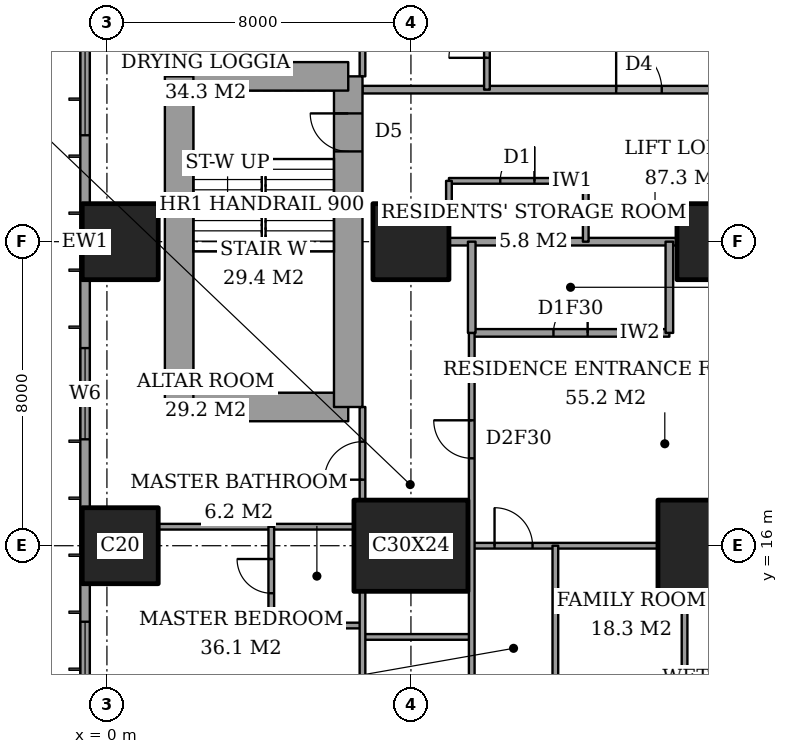
"""IFC4 building model, lengths in metres.
Left out: names, types, materials, properties, quantities, classifications, styles, units other than length and angle.
Written with IfcOpenShell. Run it as: python <this file> out.ifc"""

import sys

from ifc_helpers import new_model, si_unit, direction, frame, frame_2d, origin, origin_2d, place, context, subcontext, project, spatial, rectangle, extrude, element, fill, save


model = new_model("IFC4")
c1 = context("Model", 3, precision=1e-05, world=origin(), true_north=direction((0.0, 1.0)))
c2 = subcontext(c1, "Body", "Model", "MODEL_VIEW")
j1 = project(units=[si_unit("LENGTHUNIT", "METRE"), si_unit("PLANEANGLEUNIT", "RADIAN")], contexts=[c1])
p1 = place(None, origin())
s1 = spatial("IfcSite", under=j1, at=p1, CompositionType="ELEMENT")
p2 = place(p1, origin())
s2 = spatial("IfcBuilding", under=s1, at=p2, CompositionType="ELEMENT")
p3 = place(p2, frame((0.0, 0.0, 80.0)))
s3 = spatial("IfcBuildingStorey", under=s2, at=p3, CompositionType="ELEMENT", Elevation=80.0)
for number, where, z_axis, x_axis in (
    (1, (0.35, 16.0, 0.0), (0.0, 0.0, 1.0), (1.0, 0.0, 0.0)),
    (2, (0.35, 24.0, 0.0), (0.0, 0.0, 1.0), (1.0, 0.0, 0.0)),
):
    element("IfcColumn", number, at=place(p3, frame(where, z_axis=z_axis, x_axis=x_axis)), inside=s3, PredefinedType="COLUMN", context=c2, shape_type="SweptSolid", body=[
        extrude(rectangle(XDim=2.0, YDim=2.0, at=origin_2d()), origin(), (0.0, 0.0, 1.0), 3.6),
    ])
p4 = place(p3, frame((8.0, 16.0, 0.0), z_axis=(0.0, 0.0, 1.0), x_axis=(1.0, 0.0, 0.0)))
e3 = element("IfcColumn", 3, at=p4, inside=s3, PredefinedType="COLUMN", context=c2, shape_type="SweptSolid", body=[
    extrude(rectangle(XDim=3.0, YDim=2.4, at=origin_2d()), origin(), (0.0, 0.0, 1.0), 3.6),
])
p5 = place(p3, frame((8.0, 24.0, 0.0), z_axis=(0.0, 0.0, 1.0), x_axis=(1.0, 0.0, 0.0)))
e4 = element("IfcColumn", 4, at=p5, inside=s3, PredefinedType="COLUMN", context=c2, shape_type="SweptSolid", body=[
    extrude(rectangle(XDim=2.0, YDim=2.0, at=origin_2d()), origin(), (0.0, 0.0, 1.0), 3.6),
])
p6 = place(p3, frame((16.0, 16.0, 0.0), z_axis=(0.0, 0.0, 1.0), x_axis=(1.0, 0.0, 0.0)))
e5 = element("IfcColumn", 5, at=p6, inside=s3, PredefinedType="COLUMN", context=c2, shape_type="SweptSolid", body=[
    extrude(rectangle(XDim=3.0, YDim=2.4, at=origin_2d()), origin(), (0.0, 0.0, 1.0), 3.6),
])
p7 = place(p3, frame((16.0, 24.0, 0.0), z_axis=(0.0, 0.0, 1.0), x_axis=(1.0, 0.0, 0.0)))
e6 = element("IfcColumn", 6, at=p7, inside=s3, PredefinedType="COLUMN", context=c2, shape_type="SweptSolid", body=[
    extrude(rectangle(XDim=2.0, YDim=2.0, at=origin_2d()), origin(), (0.0, 0.0, 1.0), 3.6),
])
p8 = place(p3, frame((1.9, 19.65, 0.0), z_axis=(0.0, 0.0, 1.0), x_axis=(1.0, 0.0, 0.0)))
e7 = element("IfcWall", 7, at=p8, inside=s3, PredefinedType="SHEAR", context=c2, shape_type="SweptSolid", body=[
    extrude(rectangle(XDim=4.45, YDim=0.75, at=frame_2d((2.225, 0.0))), origin(), (0.0, 0.0, 1.0), 3.6),
])
p9 = place(p3, frame((6.35, 19.65, 0.0), z_axis=(0.0, 0.0, 1.0), x_axis=(0.0, 1.0, 0.0)))
e8 = element("IfcWall", 8, at=p9, inside=s3, PredefinedType="SHEAR", context=c2, shape_type="SweptSolid", body=[
    extrude(rectangle(XDim=8.7, YDim=0.75, at=frame_2d((4.35, 0.0))), origin(), (0.0, 0.0, 1.0), 3.6),
])
p10 = place(p9, frame((6.725, 0.0, 0.0)))
e9 = element("IfcOpeningElement", 9, at=p10, cuts=e8, PredefinedType="OPENING", context=c2, shape_type="SweptSolid", body=[
    extrude(rectangle(XDim=1.0, YDim=2.1, at=frame_2d((0.5, 1.05))), frame((0.0, 0.385, 0.0), z_axis=(0.0, -1.0, 0.0), x_axis=(1.0, 0.0, 0.0)), (0.0, 0.0, 1.0), 0.77),
])
p11 = place(p3, frame((6.35, 28.35, 0.0), z_axis=(0.0, 0.0, 1.0), x_axis=(-1.0, 0.0, 0.0)))
e10 = element("IfcWall", 10, at=p11, inside=s3, PredefinedType="SHEAR", context=c2, shape_type="SweptSolid", body=[
    extrude(rectangle(XDim=4.45, YDim=0.75, at=frame_2d((2.225, 0.0))), origin(), (0.0, 0.0, 1.0), 3.6),
])
p12 = place(p3, frame((1.9, 28.35, 0.0), z_axis=(0.0, 0.0, 1.0), x_axis=(0.0, -1.0, 0.0)))
e11 = element("IfcWall", 11, at=p12, inside=s3, PredefinedType="SHEAR", context=c2, shape_type="SweptSolid", body=[
    extrude(rectangle(XDim=8.7, YDim=0.75, at=frame_2d((4.35, 0.0))), origin(), (0.0, 0.0, 1.0), 3.6),
])
p13 = place(p3, frame((-0.575, 44.825, 0.0), z_axis=(0.0, 0.0, 1.0), x_axis=(0.0, -1.0, 0.0)))
e12 = element("IfcWall", 12, at=p13, inside=s3, PredefinedType="SOLIDWALL", context=c2, shape_type="SweptSolid", body=[
    extrude(rectangle(XDim=41.65, YDim=0.25, at=frame_2d((20.825, 0.0))), origin(), (0.0, 0.0, 1.0), 3.6),
])
p14 = place(p13, frame((0.775, 0.0, 0.6)))
e13 = element("IfcOpeningElement", 13, at=p14, cuts=e12, PredefinedType="OPENING", context=c2, shape_type="SweptSolid", body=[
    extrude(rectangle(XDim=2.4, YDim=2.0, at=frame_2d((1.2, 1.0))), frame((0.0, 0.135, 0.0), z_axis=(0.0, -1.0, 0.0), x_axis=(1.0, 0.0, 0.0)), (0.0, 0.0, 1.0), 0.27),
])
p15 = place(p13, frame((6.1, 0.0, 0.6)))
e14 = element("IfcOpeningElement", 14, at=p15, cuts=e12, PredefinedType="OPENING", context=c2, shape_type="SweptSolid", body=[
    extrude(rectangle(XDim=1.2, YDim=2.0, at=frame_2d((0.6, 1.0))), frame((0.0, 0.135, 0.0), z_axis=(0.0, -1.0, 0.0), x_axis=(1.0, 0.0, 0.0)), (0.0, 0.0, 1.0), 0.27),
])
p16 = place(p13, frame((8.425, 0.0, 0.6)))
e15 = element("IfcOpeningElement", 15, at=p16, cuts=e12, PredefinedType="OPENING", context=c2, shape_type="SweptSolid", body=[
    extrude(rectangle(XDim=2.4, YDim=2.0, at=frame_2d((1.2, 1.0))), frame((0.0, 0.135, 0.0), z_axis=(0.0, -1.0, 0.0), x_axis=(1.0, 0.0, 0.0)), (0.0, 0.0, 1.0), 0.27),
])
p17 = place(p13, frame((15.625, 0.0, 0.6)))
e16 = element("IfcOpeningElement", 16, at=p17, cuts=e12, PredefinedType="OPENING", context=c2, shape_type="SweptSolid", body=[
    extrude(rectangle(XDim=2.4, YDim=2.0, at=frame_2d((1.2, 1.0))), frame((0.0, 0.135, 0.0), z_axis=(0.0, -1.0, 0.0), x_axis=(1.0, 0.0, 0.0)), (0.0, 0.0, 1.0), 0.27),
])
p18 = place(p13, frame((23.625, 0.0, 0.6)))
e17 = element("IfcOpeningElement", 17, at=p18, cuts=e12, PredefinedType="OPENING", context=c2, shape_type="SweptSolid", body=[
    extrude(rectangle(XDim=2.4, YDim=2.0, at=frame_2d((1.2, 1.0))), frame((0.0, 0.135, 0.0), z_axis=(0.0, -1.0, 0.0), x_axis=(1.0, 0.0, 0.0)), (0.0, 0.0, 1.0), 0.27),
])
p19 = place(p13, frame((30.825, 0.0, 0.6)))
e18 = element("IfcOpeningElement", 18, at=p19, cuts=e12, PredefinedType="OPENING", context=c2, shape_type="SweptSolid", body=[
    extrude(rectangle(XDim=2.4, YDim=2.0, at=frame_2d((1.2, 1.0))), frame((0.0, 0.135, 0.0), z_axis=(0.0, -1.0, 0.0), x_axis=(1.0, 0.0, 0.0)), (0.0, 0.0, 1.0), 0.27),
])
p20 = place(p13, frame((34.5, 0.0, 0.6)))
e19 = element("IfcOpeningElement", 19, at=p20, cuts=e12, PredefinedType="OPENING", context=c2, shape_type="SweptSolid", body=[
    extrude(rectangle(XDim=1.2, YDim=2.0, at=frame_2d((0.6, 1.0))), frame((0.0, 0.135, 0.0), z_axis=(0.0, -1.0, 0.0), x_axis=(1.0, 0.0, 0.0)), (0.0, 0.0, 1.0), 0.27),
])
p21 = place(p13, frame((38.475, 0.0, 0.6)))
e20 = element("IfcOpeningElement", 20, at=p21, cuts=e12, PredefinedType="OPENING", context=c2, shape_type="SweptSolid", body=[
    extrude(rectangle(XDim=2.4, YDim=2.0, at=frame_2d((1.2, 1.0))), frame((0.0, 0.135, 0.0), z_axis=(0.0, -1.0, 0.0), x_axis=(1.0, 0.0, 0.0)), (0.0, 0.0, 1.0), 0.27),
])
p22 = place(p3, frame((6.725, 13.6, 0.0), z_axis=(0.0, 0.0, 1.0), x_axis=(1.0, 0.0, 0.0)))
e21 = element("IfcWall", 21, at=p22, inside=s3, PredefinedType="PARTITIONING", context=c2, shape_type="SweptSolid", body=[
    extrude(rectangle(XDim=2.875, YDim=0.15, at=frame_2d((1.438, 0.0))), origin(), (0.0, 0.0, 1.0), 3.35),
])
p23 = place(p3, frame((4.325, 13.9, 0.0), z_axis=(0.0, 0.0, 1.0), x_axis=(1.0, 0.0, 0.0)))
e22 = element("IfcWall", 22, at=p23, inside=s3, PredefinedType="PARTITIONING", context=c2, shape_type="SweptSolid", body=[
    extrude(rectangle(XDim=2.4, YDim=0.15, at=frame_2d((1.2, 0.0))), origin(), (0.0, 0.0, 1.0), 3.35),
])
p24 = place(p3, frame((9.6, 16.0, 0.0), z_axis=(0.0, 0.0, 1.0), x_axis=(1.0, 0.0, 0.0)))
e23 = element("IfcWall", 23, at=p24, inside=s3, PredefinedType="PARTITIONING", context=c2, shape_type="SweptSolid", body=[
    extrude(rectangle(XDim=4.9, YDim=0.15, at=frame_2d((2.45, 0.0))), origin(), (0.0, 0.0, 1.0), 2.634),
])
p25 = place(p24, frame((0.6, 0.0, 0.0)))
e24 = element("IfcOpeningElement", 24, at=p25, cuts=e23, PredefinedType="OPENING", context=c2, shape_type="SweptSolid", body=[
    extrude(rectangle(XDim=1.0, YDim=2.1, at=frame_2d((0.5, 1.05))), frame((0.0, 0.085, 0.0), z_axis=(0.0, -1.0, 0.0), x_axis=(1.0, 0.0, 0.0)), (0.0, 0.0, 1.0), 0.17),
])
p26 = place(p3, frame((1.35, 16.5, 0.0), z_axis=(0.0, 0.0, 1.0), x_axis=(1.0, 0.0, 0.0)))
e25 = element("IfcWall", 25, at=p26, inside=s3, PredefinedType="PARTITIONING", context=c2, shape_type="SweptSolid", body=[
    extrude(rectangle(XDim=5.15, YDim=0.15, at=frame_2d((2.575, 0.0))), origin(), (0.0, 0.0, 1.0), 3.35),
])
p27 = place(p3, frame((9.6, 21.6, 0.0), z_axis=(0.0, 0.0, 1.0), x_axis=(1.0, 0.0, 0.0)))
e26 = element("IfcWall", 26, at=p27, inside=s3, PredefinedType="PARTITIONING", context=c2, shape_type="SweptSolid", body=[
    extrude(rectangle(XDim=5.2, YDim=0.2, at=frame_2d((2.6, 0.0))), origin(), (0.0, 0.0, 1.0), 3.35),
])
p28 = place(p27, frame((2.15, 0.0, 0.0)))
e27 = element("IfcOpeningElement", 27, at=p28, cuts=e26, PredefinedType="OPENING", context=c2, shape_type="SweptSolid", body=[
    extrude(rectangle(XDim=0.9, YDim=2.1, at=frame_2d((0.45, 1.05))), frame((0.0, 0.11, 0.0), z_axis=(0.0, -1.0, 0.0), x_axis=(1.0, 0.0, 0.0)), (0.0, 0.0, 1.0), 0.22),
])
p29 = place(p3, frame((9.0, 24.0, 0.0), z_axis=(0.0, 0.0, 1.0), x_axis=(1.0, 0.0, 0.0)))
e28 = element("IfcWall", 28, at=p29, inside=s3, PredefinedType="PARTITIONING", context=c2, shape_type="SweptSolid", body=[
    extrude(rectangle(XDim=6.0, YDim=0.2, at=frame_2d((3.0, 0.0))), origin(), (0.0, 0.0, 1.0), 3.35),
])
p30 = place(p3, frame((9.0, 25.6, 0.0), z_axis=(0.0, 0.0, 1.0), x_axis=(1.0, 0.0, 0.0)))
e29 = element("IfcWall", 29, at=p30, inside=s3, PredefinedType="PARTITIONING", context=c2, shape_type="SweptSolid", body=[
    extrude(rectangle(XDim=3.6, YDim=0.15, at=frame_2d((1.8, 0.0))), origin(), (0.0, 0.0, 1.0), 3.35),
])
p31 = place(p30, frame((1.35, 0.0, 0.0)))
e30 = element("IfcOpeningElement", 30, at=p31, cuts=e29, PredefinedType="OPENING", context=c2, shape_type="SweptSolid", body=[
    extrude(rectangle(XDim=0.9, YDim=2.1, at=frame_2d((0.45, 1.05))), frame((0.0, 0.085, 0.0), z_axis=(0.0, -1.0, 0.0), x_axis=(1.0, 0.0, 0.0)), (0.0, 0.0, 1.0), 0.17),
])
p32 = place(p3, frame((6.725, 28.0, 0.0), z_axis=(0.0, 0.0, 1.0), x_axis=(1.0, 0.0, 0.0)))
e31 = element("IfcWall", 31, at=p32, inside=s3, PredefinedType="PARTITIONING", context=c2, shape_type="SweptSolid", body=[
    extrude(rectangle(XDim=17.275, YDim=0.2, at=frame_2d((8.637, 0.0))), origin(), (0.0, 0.0, 1.0), 3.35),
])
p33 = place(p32, frame((6.675, 0.0, 0.0)))
e32 = element("IfcOpeningElement", 32, at=p33, cuts=e31, PredefinedType="OPENING", context=c2, shape_type="SweptSolid", body=[
    extrude(rectangle(XDim=1.2, YDim=2.4, at=frame_2d((0.6, 1.2))), frame((0.0, 0.11, 0.0), z_axis=(0.0, -1.0, 0.0), x_axis=(1.0, 0.0, 0.0)), (0.0, 0.0, 1.0), 0.22),
])
p34 = place(p3, frame((4.325, 13.9, 0.0), z_axis=(0.0, 0.0, 1.0), x_axis=(0.0, 1.0, 0.0)))
e33 = element("IfcWall", 33, at=p34, inside=s3, PredefinedType="PARTITIONING", context=c2, shape_type="SweptSolid", body=[
    extrude(rectangle(XDim=2.6, YDim=0.15, at=frame_2d((1.3, 0.0))), origin(), (0.0, 0.0, 1.0), 3.35),
])
p35 = place(p34, frame((0.85, 0.0, 0.0)))
e34 = element("IfcOpeningElement", 34, at=p35, cuts=e33, PredefinedType="OPENING", context=c2, shape_type="SweptSolid", body=[
    extrude(rectangle(XDim=0.9, YDim=2.1, at=frame_2d((0.45, 1.05))), frame((0.0, 0.085, 0.0), z_axis=(0.0, -1.0, 0.0), x_axis=(1.0, 0.0, 0.0)), (0.0, 0.0, 1.0), 0.17),
])
p36 = place(p3, frame((6.725, 10.6, 0.0), z_axis=(0.0, 0.0, 1.0), x_axis=(0.0, 1.0, 0.0)))
e35 = element("IfcWall", 35, at=p36, inside=s3, PredefinedType="PARTITIONING", context=c2, shape_type="SweptSolid", body=[
    extrude(rectangle(XDim=4.2, YDim=0.15, at=frame_2d((2.1, 0.0))), origin(), (0.0, 0.0, 1.0), 3.35),
])
p37 = place(p36, frame((1.05, 0.0, 0.0)))
e36 = element("IfcOpeningElement", 36, at=p37, cuts=e35, PredefinedType="OPENING", context=c2, shape_type="SweptSolid", body=[
    extrude(rectangle(XDim=0.9, YDim=2.1, at=frame_2d((0.45, 1.05))), frame((0.0, 0.085, 0.0), z_axis=(0.0, -1.0, 0.0), x_axis=(1.0, 0.0, 0.0)), (0.0, 0.0, 1.0), 0.17),
])
p38 = place(p3, frame((6.725, 17.2, 0.0), z_axis=(0.0, 0.0, 1.0), x_axis=(0.0, 1.0, 0.0)))
e37 = element("IfcWall", 37, at=p38, inside=s3, PredefinedType="PARTITIONING", context=c2, shape_type="SweptSolid", body=[
    extrude(rectangle(XDim=2.45, YDim=0.15, at=frame_2d((1.225, 0.0))), origin(), (0.0, 0.0, 1.0), 3.35),
])
p39 = place(p38, frame((0.538, 0.0, 0.0)))
e38 = element("IfcOpeningElement", 38, at=p39, cuts=e37, PredefinedType="OPENING", context=c2, shape_type="SweptSolid", body=[
    extrude(rectangle(XDim=1.0, YDim=2.1, at=frame_2d((0.5, 1.05))), frame((0.0, 0.085, 0.0), z_axis=(0.0, -1.0, 0.0), x_axis=(1.0, 0.0, 0.0)), (0.0, 0.0, 1.0), 0.17),
])
p40 = place(p3, frame((6.725, 28.35, 0.0), z_axis=(0.0, 0.0, 1.0), x_axis=(0.0, 1.0, 0.0)))
e39 = element("IfcWall", 39, at=p40, inside=s3, PredefinedType="PARTITIONING", context=c2, shape_type="SweptSolid", body=[
    extrude(rectangle(XDim=2.45, YDim=0.15, at=frame_2d((1.225, 0.0))), origin(), (0.0, 0.0, 1.0), 3.35),
])
p41 = place(p40, frame((0.962, 0.0, 0.0)))
e40 = element("IfcOpeningElement", 40, at=p41, cuts=e39, PredefinedType="OPENING", context=c2, shape_type="SweptSolid", body=[
    extrude(rectangle(XDim=0.9, YDim=2.1, at=frame_2d((0.45, 1.05))), frame((0.0, 0.085, 0.0), z_axis=(0.0, -1.0, 0.0), x_axis=(1.0, 0.0, 0.0)), (0.0, 0.0, 1.0), 0.17),
])
p42 = place(p3, frame((9.0, 25.0, 0.0), z_axis=(0.0, 0.0, 1.0), x_axis=(0.0, 1.0, 0.0)))
e41 = element("IfcWall", 41, at=p42, inside=s3, PredefinedType="PARTITIONING", context=c2, shape_type="SweptSolid", body=[
    extrude(rectangle(XDim=0.6, YDim=0.15, at=frame_2d((0.3, 0.0))), origin(), (0.0, 0.0, 1.0), 3.35),
])
p43 = place(p3, frame((9.6, 21.6, 0.0), z_axis=(0.0, 0.0, 1.0), x_axis=(0.0, 1.0, 0.0)))
e42 = element("IfcWall", 42, at=p43, inside=s3, PredefinedType="PARTITIONING", context=c2, shape_type="SweptSolid", body=[
    extrude(rectangle(XDim=2.4, YDim=0.2, at=frame_2d((1.2, 0.0))), origin(), (0.0, 0.0, 1.0), 3.35),
])
p44 = place(p3, frame((9.6, 10.6, 0.0), z_axis=(0.0, 0.0, 1.0), x_axis=(0.0, 1.0, 0.0)))
e43 = element("IfcWall", 43, at=p44, inside=s3, PredefinedType="PARTITIONING", context=c2, shape_type="SweptSolid", body=[
    extrude(rectangle(XDim=11.0, YDim=0.15, at=frame_2d((5.5, 0.0))), origin(), (0.0, 0.0, 1.0), 3.35),
])
p45 = place(p44, frame((7.7, 0.0, 0.0)))
e44 = element("IfcOpeningElement", 44, at=p45, cuts=e43, PredefinedType="OPENING", context=c2, shape_type="SweptSolid", body=[
    extrude(rectangle(XDim=1.0, YDim=2.1, at=frame_2d((0.5, 1.05))), frame((0.0, 0.085, 0.0), z_axis=(0.0, -1.0, 0.0), x_axis=(1.0, 0.0, 0.0)), (0.0, 0.0, 1.0), 0.17),
])
p46 = place(p3, frame((10.0, 28.0, 0.0), z_axis=(0.0, 0.0, 1.0), x_axis=(0.0, 1.0, 0.0)))
e45 = element("IfcWall", 45, at=p46, inside=s3, PredefinedType="PARTITIONING", context=c2, shape_type="SweptSolid", body=[
    extrude(rectangle(XDim=3.0, YDim=0.15, at=frame_2d((1.5, 0.0))), origin(), (0.0, 0.0, 1.0), 3.35),
])
p47 = place(p46, frame((0.837, 0.0, 0.0)))
e46 = element("IfcOpeningElement", 46, at=p47, cuts=e45, PredefinedType="OPENING", context=c2, shape_type="SweptSolid", body=[
    extrude(rectangle(XDim=1.0, YDim=2.1, at=frame_2d((0.5, 1.05))), frame((0.0, 0.085, 0.0), z_axis=(0.0, -1.0, 0.0), x_axis=(1.0, 0.0, 0.0)), (0.0, 0.0, 1.0), 0.17),
])
p48 = place(p3, frame((11.8, 10.6, 0.0), z_axis=(0.0, 0.0, 1.0), x_axis=(0.0, 1.0, 0.0)))
e47 = element("IfcWall", 47, at=p48, inside=s3, PredefinedType="PARTITIONING", context=c2, shape_type="SweptSolid", body=[
    extrude(rectangle(XDim=5.4, YDim=0.15, at=frame_2d((2.7, 0.0))), origin(), (0.0, 0.0, 1.0), 3.35),
])
p49 = place(p3, frame((12.6, 24.0, 0.0), z_axis=(0.0, 0.0, 1.0), x_axis=(0.0, 1.0, 0.0)))
e48 = element("IfcWall", 48, at=p49, inside=s3, PredefinedType="PARTITIONING", context=c2, shape_type="SweptSolid", body=[
    extrude(rectangle(XDim=1.6, YDim=0.15, at=frame_2d((0.8, 0.0))), origin(), (0.0, 0.0, 1.0), 3.35),
])
p50 = place(p3, frame((14.8, 21.6, 0.0), z_axis=(0.0, 0.0, 1.0), x_axis=(0.0, 1.0, 0.0)))
e49 = element("IfcWall", 49, at=p50, inside=s3, PredefinedType="PARTITIONING", context=c2, shape_type="SweptSolid", body=[
    extrude(rectangle(XDim=2.4, YDim=0.2, at=frame_2d((1.2, 0.0))), origin(), (0.0, 0.0, 1.0), 3.35),
])
p51 = place(p3, frame((15.2, 10.6, 0.0), z_axis=(0.0, 0.0, 1.0), x_axis=(0.0, 1.0, 0.0)))
e50 = element("IfcWall", 50, at=p51, inside=s3, PredefinedType="PARTITIONING", context=c2, shape_type="SweptSolid", body=[
    extrude(rectangle(XDim=4.2, YDim=0.15, at=frame_2d((2.1, 0.0))), origin(), (0.0, 0.0, 1.0), 3.35),
])
p52 = place(p17, origin())
e51 = element("IfcWindow", 51, at=p52, inside=s3, PartitioningType="SINGLE_PANEL", PredefinedType="WINDOW", context=c2, shape_type="SweptSolid", body=[
    extrude(rectangle(XDim=2.4, YDim=2.0, at=frame_2d((1.2, 1.0))), frame((0.0, 0.03, 0.0), z_axis=(0.0, -1.0, 0.0), x_axis=(1.0, 0.0, 0.0)), (0.0, 0.0, 1.0), 0.06),
])
fill(e16, e51)
p53 = place(p18, origin())
e52 = element("IfcWindow", 52, at=p53, inside=s3, PartitioningType="SINGLE_PANEL", PredefinedType="WINDOW", context=c2, shape_type="SweptSolid", body=[
    extrude(rectangle(XDim=2.4, YDim=2.0, at=frame_2d((1.2, 1.0))), frame((0.0, 0.03, 0.0), z_axis=(0.0, -1.0, 0.0), x_axis=(1.0, 0.0, 0.0)), (0.0, 0.0, 1.0), 0.06),
])
fill(e17, e52)
p54 = place(p19, origin())
e53 = element("IfcWindow", 53, at=p54, inside=s3, PartitioningType="SINGLE_PANEL", PredefinedType="WINDOW", context=c2, shape_type="SweptSolid", body=[
    extrude(rectangle(XDim=2.4, YDim=2.0, at=frame_2d((1.2, 1.0))), frame((0.0, 0.03, 0.0), z_axis=(0.0, -1.0, 0.0), x_axis=(1.0, 0.0, 0.0)), (0.0, 0.0, 1.0), 0.06),
])
fill(e18, e53)
p55 = place(p35, origin())
e54 = element("IfcDoor", 54, at=p55, inside=s3, OperationType="SINGLE_SWING_LEFT", PredefinedType="DOOR", context=c2, shape_type="SweptSolid", body=[
    extrude(rectangle(XDim=0.9, YDim=2.1, at=frame_2d((0.45, 1.05))), frame((0.0, 0.025, 0.0), z_axis=(0.0, -1.0, 0.0), x_axis=(1.0, 0.0, 0.0)), (0.0, 0.0, 1.0), 0.05),
])
fill(e34, e54)
p56 = place(p39, origin())
e55 = element("IfcDoor", 55, at=p56, inside=s3, OperationType="SINGLE_SWING_RIGHT", PredefinedType="DOOR", context=c2, shape_type="SweptSolid", body=[
    extrude(rectangle(XDim=1.0, YDim=2.1, at=frame_2d((0.5, 1.05))), frame((0.0, 0.025, 0.0), z_axis=(0.0, -1.0, 0.0), x_axis=(1.0, 0.0, 0.0)), (0.0, 0.0, 1.0), 0.05),
])
fill(e38, e55)
p57 = place(p45, origin())
e56 = element("IfcDoor", 56, at=p57, inside=s3, OperationType="SINGLE_SWING_LEFT", PredefinedType="DOOR", context=c2, shape_type="SweptSolid", body=[
    extrude(rectangle(XDim=1.0, YDim=2.1, at=frame_2d((0.5, 1.05))), frame((0.0, 0.025, 0.0), z_axis=(0.0, -1.0, 0.0), x_axis=(1.0, 0.0, 0.0)), (0.0, 0.0, 1.0), 0.05),
])
fill(e44, e56)
p58 = place(p28, origin())
e57 = element("IfcDoor", 57, at=p58, inside=s3, OperationType="SINGLE_SWING_LEFT", PredefinedType="DOOR", context=c2, shape_type="SweptSolid", body=[
    extrude(rectangle(XDim=0.9, YDim=2.1, at=frame_2d((0.45, 1.05))), frame((0.0, 0.025, 0.0), z_axis=(0.0, -1.0, 0.0), x_axis=(1.0, 0.0, 0.0)), (0.0, 0.0, 1.0), 0.05),
])
fill(e27, e57)
p59 = place(p25, origin())
e58 = element("IfcDoor", 58, at=p59, inside=s3, OperationType="SINGLE_SWING_RIGHT", PredefinedType="DOOR", context=c2, shape_type="SweptSolid", body=[
    extrude(rectangle(XDim=1.0, YDim=2.1, at=frame_2d((0.5, 1.05))), frame((0.0, 0.025, 0.0), z_axis=(0.0, -1.0, 0.0), x_axis=(1.0, 0.0, 0.0)), (0.0, 0.0, 1.0), 0.05),
])
fill(e24, e58)
p60 = place(p47, origin())
e59 = element("IfcDoor", 59, at=p60, inside=s3, OperationType="SINGLE_SWING_RIGHT", PredefinedType="DOOR", context=c2, shape_type="SweptSolid", body=[
    extrude(rectangle(XDim=1.0, YDim=2.1, at=frame_2d((0.5, 1.05))), frame((0.0, 0.025, 0.0), z_axis=(0.0, -1.0, 0.0), x_axis=(1.0, 0.0, 0.0)), (0.0, 0.0, 1.0), 0.05),
])
fill(e46, e59)
p61 = place(p33, origin())
e60 = element("IfcDoor", 60, at=p61, inside=s3, OperationType="SINGLE_SWING_RIGHT", PredefinedType="DOOR", context=c2, shape_type="SweptSolid", body=[
    extrude(rectangle(XDim=1.2, YDim=2.4, at=frame_2d((0.6, 1.2))), frame((0.0, 0.025, 0.0), z_axis=(0.0, -1.0, 0.0), x_axis=(1.0, 0.0, 0.0)), (0.0, 0.0, 1.0), 0.05),
])
fill(e32, e60)
p62 = place(p31, origin())
e61 = element("IfcDoor", 61, at=p62, inside=s3, OperationType="SINGLE_SWING_LEFT", PredefinedType="DOOR", context=c2, shape_type="SweptSolid", body=[
    extrude(rectangle(XDim=0.9, YDim=2.1, at=frame_2d((0.45, 1.05))), frame((0.0, 0.025, 0.0), z_axis=(0.0, -1.0, 0.0), x_axis=(1.0, 0.0, 0.0)), (0.0, 0.0, 1.0), 0.05),
])
fill(e30, e61)
p63 = place(p10, origin())
e62 = element("IfcDoor", 62, at=p63, inside=s3, OperationType="SINGLE_SWING_LEFT", PredefinedType="DOOR", context=c2, shape_type="SweptSolid", body=[
    extrude(rectangle(XDim=1.0, YDim=2.1, at=frame_2d((0.5, 1.05))), frame((0.0, 0.025, 0.0), z_axis=(0.0, -1.0, 0.0), x_axis=(1.0, 0.0, 0.0)), (0.0, 0.0, 1.0), 0.05),
])
fill(e9, e62)
save(model, sys.argv[1])
